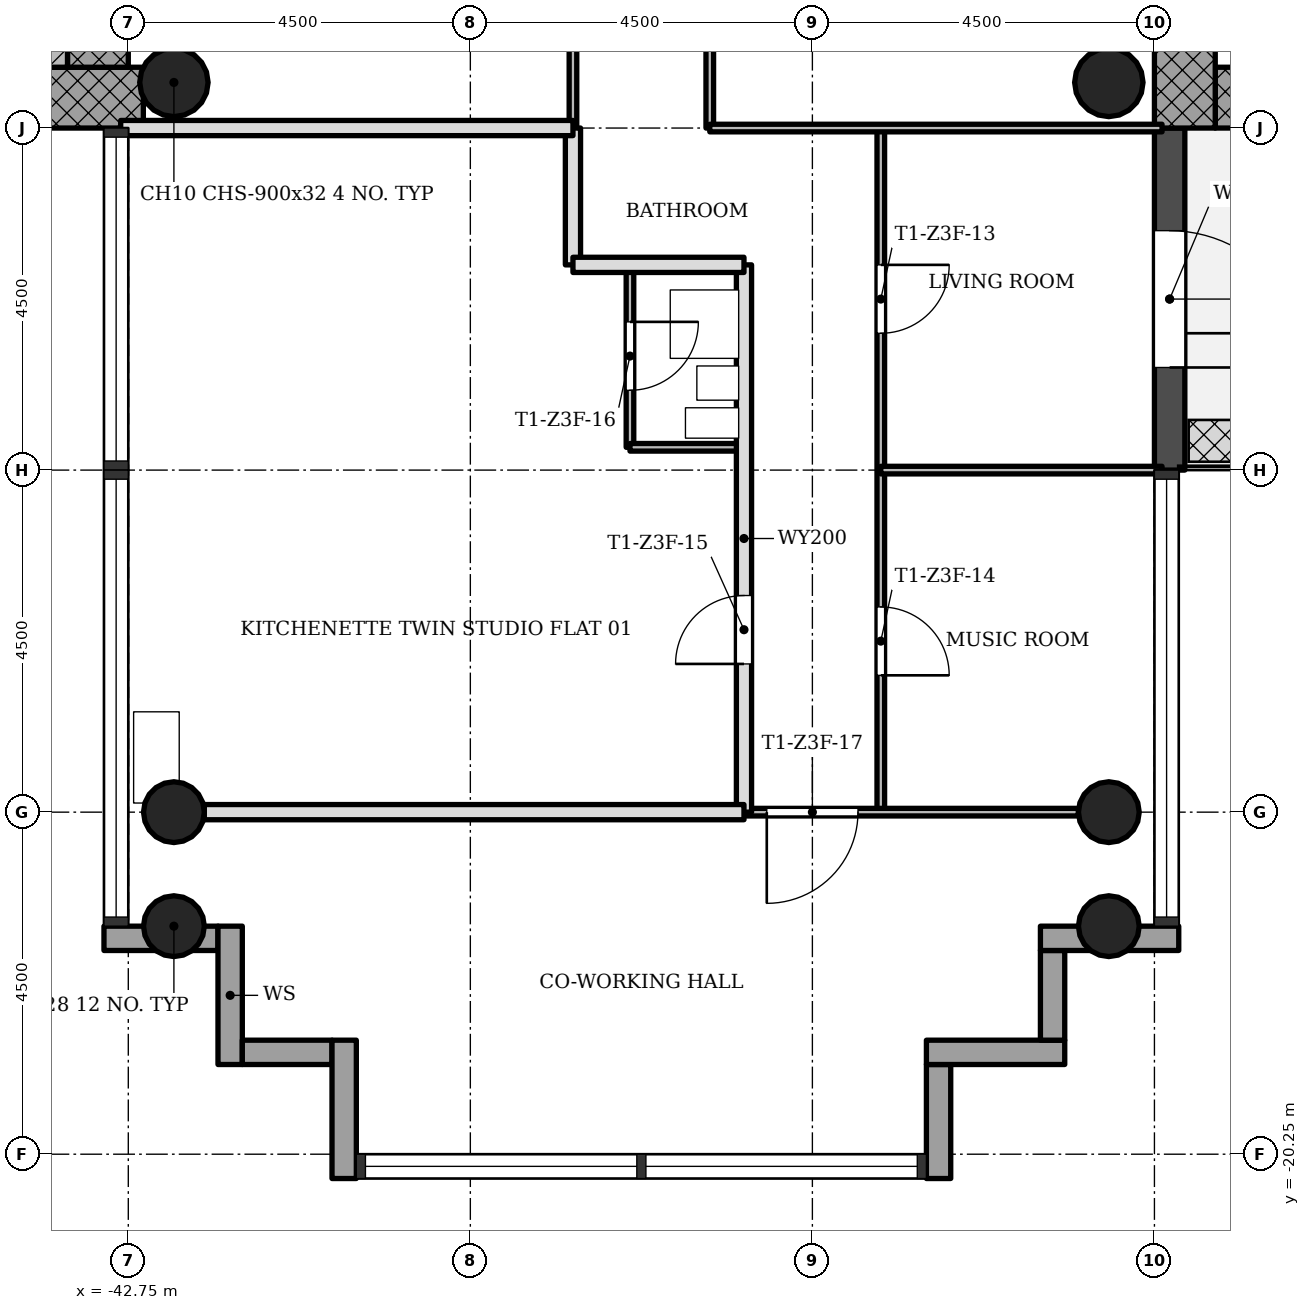
"""IFC4 building model, lengths in metres.
Left out: names, types, materials, properties, quantities, classifications, styles, units other than length and angle.
Written with IfcOpenShell. Run it as: python <this file> out.ifc"""

import sys

from ifc_helpers import new_model, si_unit, direction, frame, frame_2d, origin, origin_2d, place, context, subcontext, project, spatial, rectangle, hollow_circle, extrude, element, fill, save


model = new_model("IFC4")
c1 = context("Model", 3, precision=1e-05, world=origin(), true_north=direction((0.0, 1.0)))
c2 = subcontext(c1, "Body", "Model", "MODEL_VIEW")
j1 = project(units=[si_unit("LENGTHUNIT", "METRE"), si_unit("PLANEANGLEUNIT", "RADIAN")], contexts=[c1])
p1 = place(None, origin())
s1 = spatial("IfcSite", under=j1, at=p1, CompositionType="ELEMENT")
p2 = place(p1, origin())
s2 = spatial("IfcBuilding", under=s1, at=p2, CompositionType="ELEMENT")
p3 = place(p2, frame((0.0, 0.0, 167.7)))
s3 = spatial("IfcBuildingStorey", under=s2, at=p3, CompositionType="ELEMENT", Elevation=167.7)
p4 = place(p3, frame((-28.45, -6.35, 0.0), z_axis=(0.0, 0.0, 1.0), x_axis=(1.0, 0.0, 0.0)))
e1 = element("IfcWall", 1, at=p4, inside=s3, PredefinedType="SHEAR", context=c2, shape_type="SweptSolid", body=[
    extrude(rectangle(XDim=8.2, YDim=0.8, at=frame_2d((4.1, 0.0))), origin(), (0.0, 0.0, 1.0), 3.4),
])
p5 = place(p3, frame((-28.85, 5.95, 0.0), z_axis=(0.0, 0.0, 1.0), x_axis=(0.0, -1.0, 0.0)))
e2 = element("IfcWall", 2, at=p5, inside=s3, PredefinedType="SHEAR", context=c2, shape_type="SweptSolid", body=[
    extrude(rectangle(XDim=12.7, YDim=0.8, at=frame_2d((6.35, 0.0))), origin(), (0.0, 0.0, 1.0), 3.4),
])
p6 = place(p5, frame((5.05, 0.0, 0.0)))
e3 = element("IfcOpeningElement", 3, at=p6, cuts=e2, PredefinedType="OPENING", context=c2, shape_type="SweptSolid", body=[
    extrude(rectangle(XDim=1.8, YDim=2.1, at=frame_2d((0.9, 1.05))), frame((0.0, 0.41, 0.0), z_axis=(0.0, -1.0, 0.0), x_axis=(1.0, 0.0, 0.0)), (0.0, 0.0, 1.0), 0.82),
])
p7 = place(p3, frame((-50.95, -6.35, 0.0), z_axis=(0.0, 0.0, 1.0), x_axis=(1.0, 0.0, 0.0)))
e4 = element("IfcWall", 4, at=p7, inside=s3, PredefinedType="SHEAR", context=c2, shape_type="SweptSolid", body=[
    extrude(rectangle(XDim=8.398, YDim=0.8, at=frame_2d((4.199, 0.0))), origin(), (0.0, 0.0, 1.0), 3.4),
])
p8 = place(p3, frame((-43.15, -5.95, 0.0), z_axis=(0.0, 0.0, 1.0), x_axis=(0.0, 1.0, 0.0)))
e5 = element("IfcWall", 5, at=p8, inside=s3, PredefinedType="SHEAR", context=c2, shape_type="SweptSolid", body=[
    extrude(rectangle(XDim=12.7, YDim=0.8, at=frame_2d((6.35, 0.0))), origin(), (0.0, 0.0, 1.0), 3.4),
])
p9 = place(p8, frame((5.05, 0.0, 0.0)))
e6 = element("IfcOpeningElement", 6, at=p9, cuts=e5, PredefinedType="OPENING", context=c2, shape_type="SweptSolid", body=[
    extrude(rectangle(XDim=1.8, YDim=2.1, at=frame_2d((0.9, 1.05))), frame((0.0, 0.41, 0.0), z_axis=(0.0, -1.0, 0.0), x_axis=(1.0, 0.0, 0.0)), (0.0, 0.0, 1.0), 0.82),
])
for number, where, z_axis, x_axis in (
    (7, (-42.15, -15.75, 0.0), (0.0, 0.0, 1.0), (1.0, 0.0, 0.0)),
    (8, (-29.85, -15.75, 0.0), (0.0, 0.0, 1.0), (1.0, 0.0, 0.0)),
    (9, (-42.15, -17.25, 0.0), (0.0, 0.0, 1.0), (1.0, 0.0, 0.0)),
    (10, (-29.85, -17.25, 0.0), (0.0, 0.0, 1.0), (1.0, 0.0, 0.0)),
):
    element("IfcColumn", number, at=place(p3, frame(where, z_axis=z_axis, x_axis=x_axis)), inside=s3, PredefinedType="COLUMN", context=c2, shape_type="SweptSolid", body=[
        extrude(hollow_circle(Radius=0.4, WallThickness=0.028, at=origin_2d()), origin(), (0.0, 0.0, 1.0), 3.4),
    ])
for number, where, z_axis, x_axis in (
    (11, (-42.15, -6.15, 0.0), (0.0, 0.0, 1.0), (1.0, 0.0, 0.0)),
    (12, (-29.85, -6.15, 0.0), (0.0, 0.0, 1.0), (1.0, 0.0, 0.0)),
):
    element("IfcColumn", number, at=place(p3, frame(where, z_axis=z_axis, x_axis=x_axis)), inside=s3, PredefinedType="COLUMN", context=c2, shape_type="SweptSolid", body=[
        extrude(hollow_circle(Radius=0.45, WallThickness=0.032, at=origin_2d()), origin(), (0.0, 0.0, 1.0), 3.4),
    ])
p10 = place(p3, frame((-43.07, -17.41, -0.3), z_axis=(0.0, 0.0, 1.0), x_axis=(1.0, 0.0, 0.0)))
e13 = element("IfcWall", 13, at=p10, inside=s3, PredefinedType="STANDARD", context=c2, shape_type="SweptSolid", body=[
    extrude(rectangle(XDim=1.5, YDim=0.32, at=frame_2d((0.75, 0.0))), origin(), (0.0, 0.0, 1.0), 3.4),
])
p11 = place(p3, frame((-41.41, -17.25, -0.3), z_axis=(0.0, 0.0, 1.0), x_axis=(0.0, -1.0, 0.0)))
e14 = element("IfcWall", 14, at=p11, inside=s3, PredefinedType="STANDARD", context=c2, shape_type="SweptSolid", body=[
    extrude(rectangle(XDim=1.82, YDim=0.32, at=frame_2d((0.91, 0.0))), origin(), (0.0, 0.0, 1.0), 3.4),
])
p12 = place(p3, frame((-41.25, -18.91, -0.3), z_axis=(0.0, 0.0, 1.0), x_axis=(1.0, 0.0, 0.0)))
e15 = element("IfcWall", 15, at=p12, inside=s3, PredefinedType="STANDARD", context=c2, shape_type="SweptSolid", body=[
    extrude(rectangle(XDim=1.18, YDim=0.32, at=frame_2d((0.59, 0.0))), origin(), (0.0, 0.0, 1.0), 3.4),
])
p13 = place(p3, frame((-39.91, -18.75, -0.3), z_axis=(0.0, 0.0, 1.0), x_axis=(0.0, -1.0, 0.0)))
e16 = element("IfcWall", 16, at=p13, inside=s3, PredefinedType="STANDARD", context=c2, shape_type="SweptSolid", body=[
    extrude(rectangle(XDim=1.82, YDim=0.32, at=frame_2d((0.91, 0.0))), origin(), (0.0, 0.0, 1.0), 3.4),
])
p14 = place(p3, frame((-32.09, -20.57, -0.3), z_axis=(0.0, 0.0, 1.0), x_axis=(0.0, 1.0, 0.0)))
e17 = element("IfcWall", 17, at=p14, inside=s3, PredefinedType="STANDARD", context=c2, shape_type="SweptSolid", body=[
    extrude(rectangle(XDim=1.5, YDim=0.32, at=frame_2d((0.75, 0.0))), origin(), (0.0, 0.0, 1.0), 3.4),
])
p15 = place(p3, frame((-32.25, -18.91, -0.3), z_axis=(0.0, 0.0, 1.0), x_axis=(1.0, 0.0, 0.0)))
e18 = element("IfcWall", 18, at=p15, inside=s3, PredefinedType="STANDARD", context=c2, shape_type="SweptSolid", body=[
    extrude(rectangle(XDim=1.82, YDim=0.32, at=frame_2d((0.91, 0.0))), origin(), (0.0, 0.0, 1.0), 3.4),
])
p16 = place(p3, frame((-30.59, -18.75, -0.3), z_axis=(0.0, 0.0, 1.0), x_axis=(0.0, 1.0, 0.0)))
e19 = element("IfcWall", 19, at=p16, inside=s3, PredefinedType="STANDARD", context=c2, shape_type="SweptSolid", body=[
    extrude(rectangle(XDim=1.18, YDim=0.32, at=frame_2d((0.59, 0.0))), origin(), (0.0, 0.0, 1.0), 3.4),
])
p17 = place(p3, frame((-30.75, -17.41, -0.3), z_axis=(0.0, 0.0, 1.0), x_axis=(1.0, 0.0, 0.0)))
e20 = element("IfcWall", 20, at=p17, inside=s3, PredefinedType="STANDARD", context=c2, shape_type="SweptSolid", body=[
    extrude(rectangle(XDim=1.82, YDim=0.32, at=frame_2d((0.91, 0.0))), origin(), (0.0, 0.0, 1.0), 3.4),
])
p18 = place(p3, frame((-29.05, -11.25, -0.02), z_axis=(0.0, 0.0, 1.0), x_axis=(0.0, 1.0, 0.0)))
e21 = element("IfcWall", 21, at=p18, inside=s3, PredefinedType="STANDARD", context=c2, shape_type="SweptSolid", body=[
    extrude(rectangle(XDim=4.5, YDim=0.4, at=frame_2d((2.25, 0.0))), origin(), (0.0, 0.0, 1.0), 3.12),
])
p19 = place(p18, frame((1.35, 0.0, 0.02)))
e22 = element("IfcOpeningElement", 22, at=p19, cuts=e21, PredefinedType="OPENING", context=c2, shape_type="SweptSolid", body=[
    extrude(rectangle(XDim=1.8, YDim=2.1, at=frame_2d((0.9, 1.05))), frame((0.0, 0.21, 0.0), z_axis=(0.0, -1.0, 0.0), x_axis=(1.0, 0.0, 0.0)), (0.0, 0.0, 1.0), 0.42),
])
p20 = place(p3, frame((-36.9, -6.75, 0.0), z_axis=(0.0, 0.0, 1.0), x_axis=(0.0, 1.0, 0.0)))
e23 = element("IfcWall", 23, at=p20, inside=s3, PredefinedType="PARTITIONING", context=c2, shape_type="SweptSolid", body=[
    extrude(rectangle(XDim=2.25, YDim=0.1, at=frame_2d((1.125, 0.0))), origin(), (0.0, 0.0, 1.0), 3.0),
])
p21 = place(p3, frame((-36.9, -8.55, 0.0), z_axis=(0.0, 0.0, 1.0), x_axis=(0.0, 1.0, 0.0)))
e24 = element("IfcWall", 24, at=p21, inside=s3, PredefinedType="SOLIDWALL", context=c2, shape_type="SweptSolid", body=[
    extrude(rectangle(XDim=1.8, YDim=0.2, at=frame_2d((0.9, 0.0))), origin(), (0.0, 0.0, 1.0), 3.0),
])
p22 = place(p3, frame((-36.15, -10.95, 0.0), z_axis=(0.0, 0.0, 1.0), x_axis=(0.0, 1.0, 0.0)))
e25 = element("IfcWall", 25, at=p22, inside=s3, PredefinedType="PARTITIONING", context=c2, shape_type="SweptSolid", body=[
    extrude(rectangle(XDim=2.4, YDim=0.1, at=frame_2d((1.2, 0.0))), origin(), (0.0, 0.0, 1.0), 3.0),
])
p23 = place(p22, frame((0.75, 0.0, 0.0)))
e26 = element("IfcOpeningElement", 26, at=p23, cuts=e25, PredefinedType="OPENING", context=c2, shape_type="SweptSolid", body=[
    extrude(rectangle(XDim=0.9, YDim=2.1, at=frame_2d((0.45, 1.05))), frame((0.0, 0.06, 0.0), z_axis=(0.0, -1.0, 0.0), x_axis=(1.0, 0.0, 0.0)), (0.0, 0.0, 1.0), 0.12),
])
p24 = place(p3, frame((-35.1, -6.75, 0.0), z_axis=(0.0, 0.0, 1.0), x_axis=(0.0, 1.0, 0.0)))
e27 = element("IfcWall", 27, at=p24, inside=s3, PredefinedType="PARTITIONING", context=c2, shape_type="SweptSolid", body=[
    extrude(rectangle(XDim=2.25, YDim=0.1, at=frame_2d((1.125, 0.0))), origin(), (0.0, 0.0, 1.0), 3.0),
])
p25 = place(p3, frame((-34.65, -15.75, 0.0), z_axis=(0.0, 0.0, 1.0), x_axis=(0.0, 1.0, 0.0)))
e28 = element("IfcWall", 28, at=p25, inside=s3, PredefinedType="SOLIDWALL", context=c2, shape_type="SweptSolid", body=[
    extrude(rectangle(XDim=7.2, YDim=0.2, at=frame_2d((3.6, 0.0))), origin(), (0.0, 0.0, 1.0), 3.0),
])
p26 = place(p25, frame((1.95, 0.0, 0.0)))
e29 = element("IfcOpeningElement", 29, at=p26, cuts=e28, PredefinedType="OPENING", context=c2, shape_type="SweptSolid", body=[
    extrude(rectangle(XDim=0.9, YDim=2.1, at=frame_2d((0.45, 1.05))), frame((0.0, 0.11, 0.0), z_axis=(0.0, -1.0, 0.0), x_axis=(1.0, 0.0, 0.0)), (0.0, 0.0, 1.0), 0.22),
])
p27 = place(p3, frame((-32.85, -15.75, 0.0), z_axis=(0.0, 0.0, 1.0), x_axis=(0.0, 1.0, 0.0)))
e30 = element("IfcWall", 30, at=p27, inside=s3, PredefinedType="PARTITIONING", context=c2, shape_type="SweptSolid", body=[
    extrude(rectangle(XDim=9.0, YDim=0.1, at=frame_2d((4.5, 0.0))), origin(), (0.0, 0.0, 1.0), 3.0),
])
p28 = place(p27, frame((6.3, 0.0, 0.0)))
e31 = element("IfcOpeningElement", 31, at=p28, cuts=e30, PredefinedType="OPENING", context=c2, shape_type="SweptSolid", body=[
    extrude(rectangle(XDim=0.9, YDim=2.1, at=frame_2d((0.45, 1.05))), frame((0.0, 0.06, 0.0), z_axis=(0.0, -1.0, 0.0), x_axis=(1.0, 0.0, 0.0)), (0.0, 0.0, 1.0), 0.12),
])
p29 = place(p27, frame((1.8, 0.0, 0.0)))
e32 = element("IfcOpeningElement", 32, at=p29, cuts=e30, PredefinedType="OPENING", context=c2, shape_type="SweptSolid", body=[
    extrude(rectangle(XDim=0.9, YDim=2.1, at=frame_2d((0.45, 1.05))), frame((0.0, 0.06, 0.0), z_axis=(0.0, -1.0, 0.0), x_axis=(1.0, 0.0, 0.0)), (0.0, 0.0, 1.0), 0.12),
])
p30 = place(p3, frame((-34.65, -15.75, 0.0), z_axis=(0.0, 0.0, 1.0), x_axis=(1.0, 0.0, 0.0)))
e33 = element("IfcWall", 33, at=p30, inside=s3, PredefinedType="PARTITIONING", context=c2, shape_type="SweptSolid", body=[
    extrude(rectangle(XDim=4.4, YDim=0.1, at=frame_2d((2.2, 0.0))), origin(), (0.0, 0.0, 1.0), 3.0),
])
p31 = place(p30, frame((0.3, 0.0, 0.0)))
e34 = element("IfcOpeningElement", 34, at=p31, cuts=e33, PredefinedType="OPENING", context=c2, shape_type="SweptSolid", body=[
    extrude(rectangle(XDim=1.2, YDim=2.1, at=frame_2d((0.6, 1.05))), frame((0.0, 0.06, 0.0), z_axis=(0.0, -1.0, 0.0), x_axis=(1.0, 0.0, 0.0)), (0.0, 0.0, 1.0), 0.12),
])
p32 = place(p3, frame((-41.75, -15.75, 0.0), z_axis=(0.0, 0.0, 1.0), x_axis=(1.0, 0.0, 0.0)))
e35 = element("IfcWall", 35, at=p32, inside=s3, PredefinedType="SOLIDWALL", context=c2, shape_type="SweptSolid", body=[
    extrude(rectangle(XDim=7.1, YDim=0.2, at=frame_2d((3.55, 0.0))), origin(), (0.0, 0.0, 1.0), 3.0),
])
p33 = place(p3, frame((-32.85, -11.25, 0.0), z_axis=(0.0, 0.0, 1.0), x_axis=(1.0, 0.0, 0.0)))
e36 = element("IfcWall", 36, at=p33, inside=s3, PredefinedType="PARTITIONING", context=c2, shape_type="SweptSolid", body=[
    extrude(rectangle(XDim=3.7, YDim=0.1, at=frame_2d((1.85, 0.0))), origin(), (0.0, 0.0, 1.0), 3.0),
])
p34 = place(p3, frame((-36.15, -10.95, 0.0), z_axis=(0.0, 0.0, 1.0), x_axis=(1.0, 0.0, 0.0)))
e37 = element("IfcWall", 37, at=p34, inside=s3, PredefinedType="PARTITIONING", context=c2, shape_type="SweptSolid", body=[
    extrude(rectangle(XDim=1.5, YDim=0.1, at=frame_2d((0.75, 0.0))), origin(), (0.0, 0.0, 1.0), 3.0),
])
p35 = place(p3, frame((-36.9, -8.55, 0.0), z_axis=(0.0, 0.0, 1.0), x_axis=(1.0, 0.0, 0.0)))
e38 = element("IfcWall", 38, at=p35, inside=s3, PredefinedType="SOLIDWALL", context=c2, shape_type="SweptSolid", body=[
    extrude(rectangle(XDim=2.25, YDim=0.2, at=frame_2d((1.125, 0.0))), origin(), (0.0, 0.0, 1.0), 3.0),
])
p36 = place(p3, frame((-35.1, -6.75, 0.0), z_axis=(0.0, 0.0, 1.0), x_axis=(1.0, 0.0, 0.0)))
e39 = element("IfcWall", 39, at=p36, inside=s3, PredefinedType="PARTITIONING", context=c2, shape_type="SweptSolid", body=[
    extrude(rectangle(XDim=5.95, YDim=0.1, at=frame_2d((2.975, 0.0))), origin(), (0.0, 0.0, 1.0), 3.0),
])
p37 = place(p3, frame((-42.85, -6.75, 0.0), z_axis=(0.0, 0.0, 1.0), x_axis=(1.0, 0.0, 0.0)))
e40 = element("IfcWall", 40, at=p37, inside=s3, PredefinedType="SOLIDWALL", context=c2, shape_type="SweptSolid", body=[
    extrude(rectangle(XDim=5.95, YDim=0.2, at=frame_2d((2.975, 0.0))), origin(), (0.0, 0.0, 1.0), 3.0),
])
p38 = place(p3, frame((-43.75, -1.85, 0.0), z_axis=(0.0, 0.0, 1.0), x_axis=(0.0, -1.0, 0.0)))
e41 = element("IfcWall", 41, at=p38, inside=s3, PredefinedType="SHEAR", context=c2, shape_type="SweptSolid", body=[
    extrude(rectangle(XDim=4.1, YDim=0.4, at=frame_2d((2.05, 0.0))), origin(), (0.0, 0.0, 1.0), 3.4),
])
p39 = place(p19, origin())
e42 = element("IfcDoor", 42, at=p39, inside=s3, OperationType="SINGLE_SWING_LEFT", PredefinedType="DOOR", context=c2, shape_type="SweptSolid", body=[
    extrude(rectangle(XDim=1.8, YDim=2.1, at=frame_2d((0.9, 1.05))), frame((0.0, 0.025, 0.0), z_axis=(0.0, -1.0, 0.0), x_axis=(1.0, 0.0, 0.0)), (0.0, 0.0, 1.0), 0.05),
])
fill(e22, e42)
p40 = place(p28, origin())
e43 = element("IfcDoor", 43, at=p40, inside=s3, OperationType="SINGLE_SWING_RIGHT", PredefinedType="DOOR", context=c2, shape_type="SweptSolid", body=[
    extrude(rectangle(XDim=0.9, YDim=2.1, at=frame_2d((0.45, 1.05))), frame((0.0, 0.025, 0.0), z_axis=(0.0, -1.0, 0.0), x_axis=(1.0, 0.0, 0.0)), (0.0, 0.0, 1.0), 0.05),
])
fill(e31, e43)
p41 = place(p29, origin())
e44 = element("IfcDoor", 44, at=p41, inside=s3, OperationType="SINGLE_SWING_LEFT", PredefinedType="DOOR", context=c2, shape_type="SweptSolid", body=[
    extrude(rectangle(XDim=0.9, YDim=2.1, at=frame_2d((0.45, 1.05))), frame((0.0, 0.025, 0.0), z_axis=(0.0, -1.0, 0.0), x_axis=(1.0, 0.0, 0.0)), (0.0, 0.0, 1.0), 0.05),
])
fill(e32, e44)
p42 = place(p26, origin())
e45 = element("IfcDoor", 45, at=p42, inside=s3, OperationType="SINGLE_SWING_RIGHT", PredefinedType="DOOR", context=c2, shape_type="SweptSolid", body=[
    extrude(rectangle(XDim=0.9, YDim=2.1, at=frame_2d((0.45, 1.05))), frame((0.0, 0.025, 0.0), z_axis=(0.0, -1.0, 0.0), x_axis=(1.0, 0.0, 0.0)), (0.0, 0.0, 1.0), 0.05),
])
fill(e29, e45)
p43 = place(p23, origin())
e46 = element("IfcDoor", 46, at=p43, inside=s3, OperationType="SINGLE_SWING_RIGHT", PredefinedType="DOOR", context=c2, shape_type="SweptSolid", body=[
    extrude(rectangle(XDim=0.9, YDim=2.1, at=frame_2d((0.45, 1.05))), frame((0.0, 0.025, 0.0), z_axis=(0.0, -1.0, 0.0), x_axis=(1.0, 0.0, 0.0)), (0.0, 0.0, 1.0), 0.05),
])
fill(e26, e46)
p44 = place(p31, origin())
e47 = element("IfcDoor", 47, at=p44, inside=s3, OperationType="SINGLE_SWING_LEFT", PredefinedType="DOOR", context=c2, shape_type="SweptSolid", body=[
    extrude(rectangle(XDim=1.2, YDim=2.1, at=frame_2d((0.6, 1.05))), frame((0.0, 0.025, 0.0), z_axis=(0.0, -1.0, 0.0), x_axis=(1.0, 0.0, 0.0)), (0.0, 0.0, 1.0), 0.05),
])
fill(e34, e47)
save(model, sys.argv[1])
